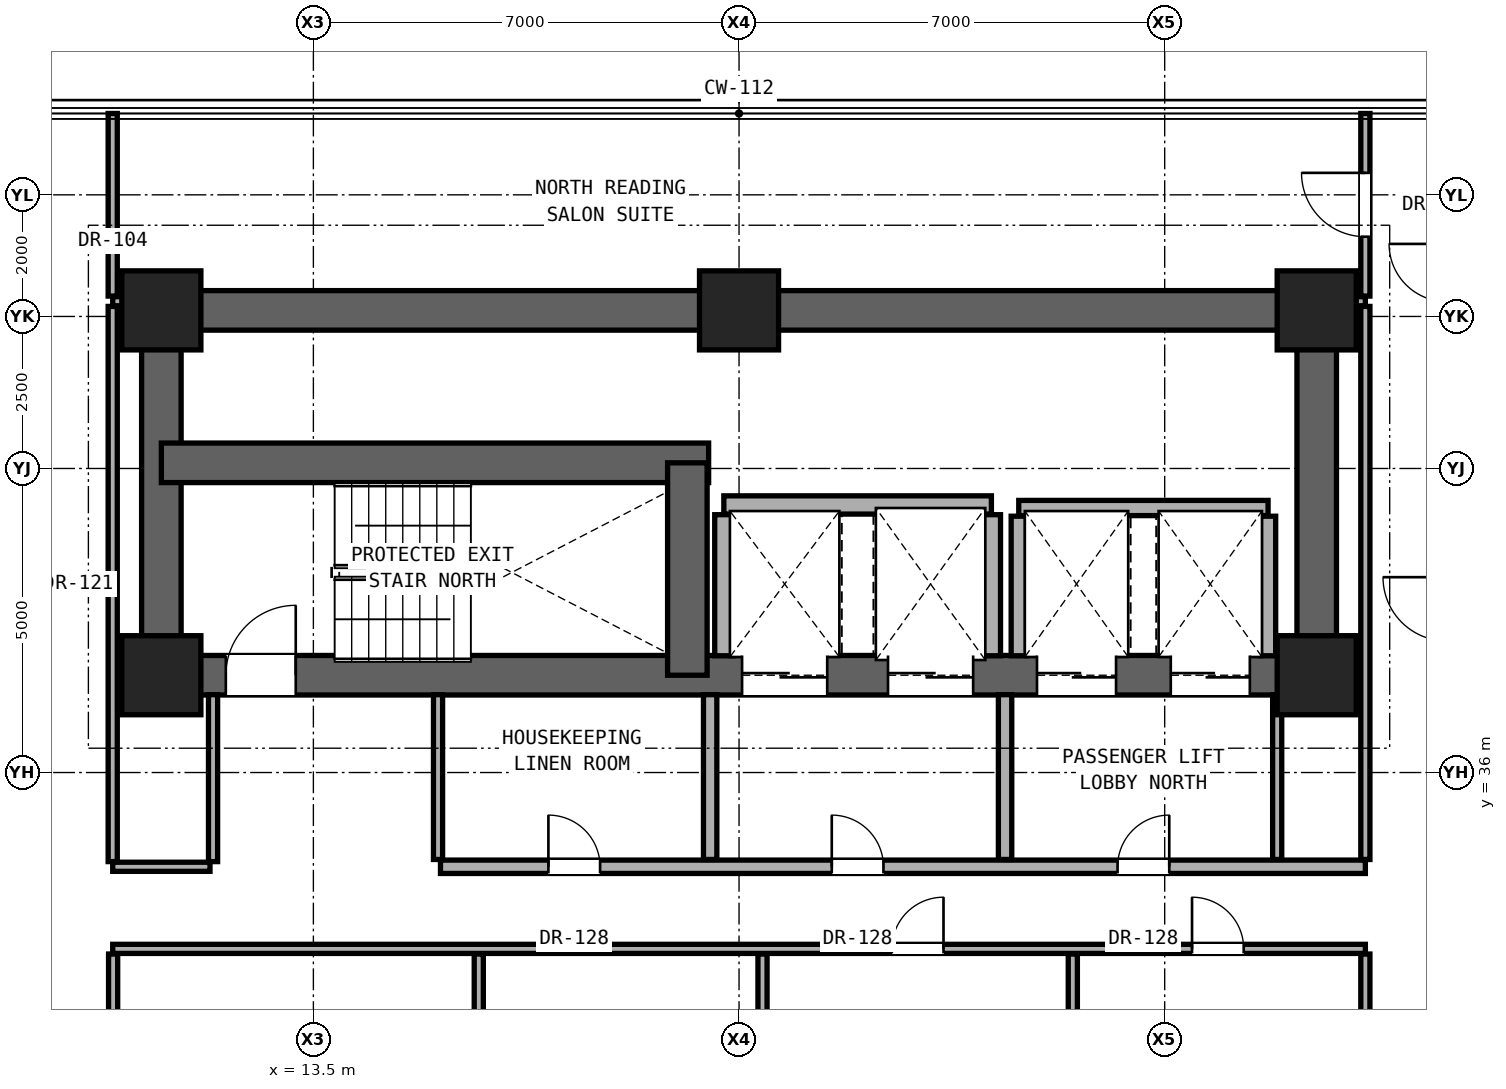
"""IFC4 building model, lengths in metres.
Left out: names, types, materials, properties, quantities, classifications, styles, units other than length and angle.
Written with IfcOpenShell. Run it as: python <this file> out.ifc"""

import sys

from ifc_helpers import new_model, si_unit, direction, frame, frame_2d, origin, origin_2d, place, context, subcontext, project, spatial, rectangle, extrude, element, fill, save


model = new_model("IFC4")
c1 = context("Model", 3, precision=1e-05, world=origin(), true_north=direction((0.0, 1.0)))
c2 = subcontext(c1, "Body", "Model", "MODEL_VIEW")
j1 = project(units=[si_unit("LENGTHUNIT", "METRE"), si_unit("PLANEANGLEUNIT", "RADIAN")], contexts=[c1])
p1 = place(None, origin())
s1 = spatial("IfcSite", under=j1, at=p1, CompositionType="ELEMENT")
p2 = place(p1, origin())
s2 = spatial("IfcBuilding", under=s1, at=p2, CompositionType="ELEMENT")
p3 = place(p2, frame((0.0, 0.0, 55.4)))
s3 = spatial("IfcBuildingStorey", under=s2, at=p3, CompositionType="ELEMENT", Elevation=55.4)
for number, where, z_axis, x_axis in (
    (1, (11.0, 37.6, 0.0), (0.0, 0.0, 1.0), (1.0, 0.0, 0.0)),
    (2, (30.0, 37.6, 0.0), (0.0, 0.0, 1.0), (1.0, 0.0, 0.0)),
    (3, (11.0, 43.6, 0.0), (0.0, 0.0, 1.0), (1.0, 0.0, 0.0)),
    (4, (20.5, 43.6, 0.0), (0.0, 0.0, 1.0), (1.0, 0.0, 0.0)),
    (5, (30.0, 43.6, 0.0), (0.0, 0.0, 1.0), (1.0, 0.0, 0.0)),
):
    element("IfcColumn", number, at=place(p3, frame(where, z_axis=z_axis, x_axis=x_axis)), inside=s3, PredefinedType="COLUMN", context=c2, shape_type="SweptSolid", body=[
        extrude(rectangle(XDim=1.3, YDim=1.3, at=origin_2d()), origin(), (0.0, 0.0, 1.0), 3.3),
    ])
p4 = place(p3, frame((11.0, 43.6, 0.0), z_axis=(0.0, 0.0, 1.0), x_axis=(1.0, 0.0, 0.0)))
e6 = element("IfcWall", 6, at=p4, inside=s3, PredefinedType="SHEAR", context=c2, shape_type="SweptSolid", body=[
    extrude(rectangle(XDim=19.0, YDim=0.65, at=frame_2d((9.5, 0.0))), origin(), (0.0, 0.0, 1.0), 3.06),
])
for number, where, z_axis, x_axis in (
    (7, (11.0, 37.6, 0.0), (0.0, 0.0, 1.0), (0.0, 1.0, 0.0)),
    (8, (30.0, 37.6, 0.0), (0.0, 0.0, 1.0), (0.0, 1.0, 0.0)),
):
    element("IfcWall", number, at=place(p3, frame(where, z_axis=z_axis, x_axis=x_axis)), inside=s3, PredefinedType="SHEAR", context=c2, shape_type="SweptSolid", body=[
        extrude(rectangle(XDim=6.0, YDim=0.65, at=frame_2d((3.0, 0.0))), origin(), (0.0, 0.0, 1.0), 3.06),
    ])
p5 = place(p3, frame((11.0, 37.6, 0.0), z_axis=(0.0, 0.0, 1.0), x_axis=(1.0, 0.0, 0.0)))
e9 = element("IfcWall", 9, at=p5, inside=s3, PredefinedType="SHEAR", context=c2, shape_type="SweptSolid", body=[
    extrude(rectangle(XDim=19.0, YDim=0.65, at=frame_2d((9.5, 0.0))), origin(), (0.0, 0.0, 1.0), 3.06),
])
p6 = place(p5, frame((1.06, 0.0, 0.0)))
e10 = element("IfcOpeningElement", 10, at=p6, cuts=e9, PredefinedType="OPENING", context=c2, shape_type="SweptSolid", body=[
    extrude(rectangle(XDim=1.15, YDim=2.2, at=frame_2d((0.575, 1.1))), frame((0.0, 0.335, 0.0), z_axis=(0.0, -1.0, 0.0), x_axis=(1.0, 0.0, 0.0)), (0.0, 0.0, 1.0), 0.67),
])
p7 = place(p5, frame((9.55, 0.0, 0.0)))
e11 = element("IfcOpeningElement", 11, at=p7, cuts=e9, PredefinedType="OPENING", context=c2, shape_type="SweptSolid", body=[
    extrude(rectangle(XDim=1.4, YDim=2.35, at=frame_2d((0.7, 1.175))), frame((0.0, 0.335, 0.0), z_axis=(0.0, -1.0, 0.0), x_axis=(1.0, 0.0, 0.0)), (0.0, 0.0, 1.0), 0.67),
])
p8 = place(p5, frame((11.95, 0.0, 0.0)))
e12 = element("IfcOpeningElement", 12, at=p8, cuts=e9, PredefinedType="OPENING", context=c2, shape_type="SweptSolid", body=[
    extrude(rectangle(XDim=1.4, YDim=2.35, at=frame_2d((0.7, 1.175))), frame((0.0, 0.335, 0.0), z_axis=(0.0, -1.0, 0.0), x_axis=(1.0, 0.0, 0.0)), (0.0, 0.0, 1.0), 0.67),
])
p9 = place(p5, frame((14.4, 0.0, 0.0)))
e13 = element("IfcOpeningElement", 13, at=p9, cuts=e9, PredefinedType="OPENING", context=c2, shape_type="SweptSolid", body=[
    extrude(rectangle(XDim=1.3, YDim=2.3, at=frame_2d((0.65, 1.15))), frame((0.0, 0.335, 0.0), z_axis=(0.0, -1.0, 0.0), x_axis=(1.0, 0.0, 0.0)), (0.0, 0.0, 1.0), 0.67),
])
p10 = place(p5, frame((16.6, 0.0, 0.0)))
e14 = element("IfcOpeningElement", 14, at=p10, cuts=e9, PredefinedType="OPENING", context=c2, shape_type="SweptSolid", body=[
    extrude(rectangle(XDim=1.3, YDim=2.3, at=frame_2d((0.65, 1.15))), frame((0.0, 0.335, 0.0), z_axis=(0.0, -1.0, 0.0), x_axis=(1.0, 0.0, 0.0)), (0.0, 0.0, 1.0), 0.67),
])
p11 = place(p3, frame((11.0, 41.093, 0.0), z_axis=(0.0, 0.0, 1.0), x_axis=(1.0, 0.0, 0.0)))
e15 = element("IfcWall", 15, at=p11, inside=s3, PredefinedType="SHEAR", context=c2, shape_type="SweptSolid", body=[
    extrude(rectangle(XDim=9.0, YDim=0.65, at=frame_2d((4.5, 0.0))), origin(), (0.0, 0.0, 1.0), 3.06),
])
p12 = place(p3, frame((19.65, 37.6, 0.0), z_axis=(0.0, 0.0, 1.0), x_axis=(0.0, 1.0, 0.0)))
e16 = element("IfcWall", 16, at=p12, inside=s3, PredefinedType="SHEAR", context=c2, shape_type="SweptSolid", body=[
    extrude(rectangle(XDim=3.493, YDim=0.65, at=frame_2d((1.747, 0.0))), origin(), (0.0, 0.0, 1.0), 3.06),
])
p13 = place(p3, frame((10.2, 33.1, 0.0), z_axis=(0.0, 0.0, 1.0), x_axis=(1.0, 0.0, 0.0)))
e17 = element("IfcWall", 17, at=p13, inside=s3, PredefinedType="PARTITIONING", context=c2, shape_type="SweptSolid", body=[
    extrude(rectangle(XDim=20.6, YDim=0.15, at=frame_2d((10.3, 0.0))), origin(), (0.0, 0.0, 1.0), 2.104),
])
p14 = place(p13, frame((12.812, 0.0, 0.0)))
e18 = element("IfcOpeningElement", 18, at=p14, cuts=e17, PredefinedType="OPENING", context=c2, shape_type="SweptSolid", body=[
    extrude(rectangle(XDim=0.85, YDim=2.01, at=frame_2d((0.425, 1.005))), frame((0.0, 0.085, 0.0), z_axis=(0.0, -1.0, 0.0), x_axis=(1.0, 0.0, 0.0)), (0.0, 0.0, 1.0), 0.17),
])
p15 = place(p13, frame((17.75, 0.0, 0.0)))
e19 = element("IfcOpeningElement", 19, at=p15, cuts=e17, PredefinedType="OPENING", context=c2, shape_type="SweptSolid", body=[
    extrude(rectangle(XDim=0.85, YDim=2.01, at=frame_2d((0.425, 1.005))), frame((0.0, 0.085, 0.0), z_axis=(0.0, -1.0, 0.0), x_axis=(1.0, 0.0, 0.0)), (0.0, 0.0, 1.0), 0.17),
])
p16 = place(p3, frame((10.2, 34.45, 0.0), z_axis=(0.0, 0.0, 1.0), x_axis=(1.0, 0.0, 0.0)))
e20 = element("IfcWall", 20, at=p16, inside=s3, PredefinedType="PARTITIONING", context=c2, shape_type="SweptSolid", body=[
    extrude(rectangle(XDim=1.6, YDim=0.15, at=frame_2d((0.8, 0.0))), origin(), (0.0, 0.0, 1.0), 2.104),
])
p17 = place(p3, frame((15.59, 34.45, 0.0), z_axis=(0.0, 0.0, 1.0), x_axis=(1.0, 0.0, 0.0)))
e21 = element("IfcWall", 21, at=p17, inside=s3, PredefinedType="SOLIDWALL", context=c2, shape_type="SweptSolid", body=[
    extrude(rectangle(XDim=15.21, YDim=0.22, at=frame_2d((7.605, 0.0))), origin(), (0.0, 0.0, 1.0), 2.104),
])
p18 = place(p17, frame((6.435, 0.0, 0.0)))
e22 = element("IfcOpeningElement", 22, at=p18, cuts=e21, PredefinedType="OPENING", context=c2, shape_type="SweptSolid", body=[
    extrude(rectangle(XDim=0.85, YDim=2.01, at=frame_2d((0.425, 1.005))), frame((0.0, 0.12, 0.0), z_axis=(0.0, -1.0, 0.0), x_axis=(1.0, 0.0, 0.0)), (0.0, 0.0, 1.0), 0.24),
])
p19 = place(p17, frame((11.135, 0.0, 0.0)))
e23 = element("IfcOpeningElement", 23, at=p19, cuts=e21, PredefinedType="OPENING", context=c2, shape_type="SweptSolid", body=[
    extrude(rectangle(XDim=0.85, YDim=2.01, at=frame_2d((0.425, 1.005))), frame((0.0, 0.12, 0.0), z_axis=(0.0, -1.0, 0.0), x_axis=(1.0, 0.0, 0.0)), (0.0, 0.0, 1.0), 0.24),
])
p20 = place(p17, frame((1.775, 0.0, 0.0)))
e24 = element("IfcOpeningElement", 24, at=p20, cuts=e21, PredefinedType="OPENING", context=c2, shape_type="SweptSolid", body=[
    extrude(rectangle(XDim=0.85, YDim=2.01, at=frame_2d((0.425, 1.005))), frame((0.0, 0.12, 0.0), z_axis=(0.0, -1.0, 0.0), x_axis=(1.0, 0.0, 0.0)), (0.0, 0.0, 1.0), 0.24),
])
p21 = place(p3, frame((25.1, 40.35, 0.0), z_axis=(0.0, 0.0, 1.0), x_axis=(1.0, 0.0, 0.0)))
e25 = element("IfcWall", 25, at=p21, inside=s3, PredefinedType="SOLIDWALL", context=c2, shape_type="SweptSolid", body=[
    extrude(rectangle(XDim=4.1, YDim=0.25, at=frame_2d((2.05, 0.0))), origin(), (0.0, 0.0, 1.0), 3.06),
])
p22 = place(p3, frame((20.25, 40.4, 0.0), z_axis=(0.0, 0.0, 1.0), x_axis=(1.0, 0.0, 0.0)))
e26 = element("IfcWall", 26, at=p22, inside=s3, PredefinedType="SOLIDWALL", context=c2, shape_type="SweptSolid", body=[
    extrude(rectangle(XDim=4.4, YDim=0.3, at=frame_2d((2.2, 0.0))), origin(), (0.0, 0.0, 1.0), 3.06),
])
for number, where, z_axis, x_axis in (
    (27, (10.2, 43.75, 0.0), (0.0, 0.0, 1.0), (1.0, 0.0, 0.0)),
    (28, (30.32, 43.75, 0.0), (0.0, 0.0, 1.0), (1.0, 0.0, 0.0)),
):
    element("IfcWall", number, at=place(p3, frame(where, z_axis=z_axis, x_axis=x_axis)), inside=s3, PredefinedType="PARTITIONING", context=c2, shape_type="SweptSolid", body=[
        extrude(rectangle(XDim=0.48, YDim=0.15, at=frame_2d((0.24, 0.0))), origin(), (0.0, 0.0, 1.0), 3.06),
    ])
p23 = place(p3, frame((10.207, 22.935, 0.0), z_axis=(0.0, 0.0, 1.0), x_axis=(0.0, 1.0, 0.0)))
e29 = element("IfcWall", 29, at=p23, inside=s3, PredefinedType="PARTITIONING", context=c2, shape_type="SweptSolid", body=[
    extrude(rectangle(XDim=10.08, YDim=0.15, at=frame_2d((5.04, 0.0))), origin(), (0.0, 0.0, 1.0), 2.279),
])
p24 = place(p23, frame((4.565, 0.0, 0.0)))
e30 = element("IfcOpeningElement", 30, at=p24, cuts=e29, PredefinedType="OPENING", context=c2, shape_type="SweptSolid", body=[
    extrude(rectangle(XDim=0.95, YDim=2.15, at=frame_2d((0.475, 1.075))), frame((0.0, 0.085, 0.0), z_axis=(0.0, -1.0, 0.0), x_axis=(1.0, 0.0, 0.0)), (0.0, 0.0, 1.0), 0.17),
])
p25 = place(p3, frame((10.2, 34.535, 0.0), z_axis=(0.0, 0.0, 1.0), x_axis=(0.0, 1.0, 0.0)))
e31 = element("IfcWall", 31, at=p25, inside=s3, PredefinedType="PARTITIONING", context=c2, shape_type="SweptSolid", body=[
    extrude(rectangle(XDim=9.13, YDim=0.15, at=frame_2d((4.565, 0.0))), origin(), (0.0, 0.0, 1.0), 2.436),
])
p26 = place(p3, frame((10.2, 43.835, 0.0), z_axis=(0.0, 0.0, 1.0), x_axis=(0.0, 1.0, 0.0)))
e32 = element("IfcWall", 32, at=p26, inside=s3, PredefinedType="PARTITIONING", context=c2, shape_type="SweptSolid", body=[
    extrude(rectangle(XDim=3.003, YDim=0.15, at=frame_2d((1.501, 0.0))), origin(), (0.0, 0.0, 1.0), 3.06),
])
p27 = place(p3, frame((11.85, 34.535, 0.0), z_axis=(0.0, 0.0, 1.0), x_axis=(0.0, 1.0, 0.0)))
e33 = element("IfcWall", 33, at=p27, inside=s3, PredefinedType="PARTITIONING", context=c2, shape_type="SweptSolid", body=[
    extrude(rectangle(XDim=2.745, YDim=0.15, at=frame_2d((1.373, 0.0))), origin(), (0.0, 0.0, 1.0), 3.06),
])
p28 = place(p3, frame((15.55, 34.57, 0.0), z_axis=(0.0, 0.0, 1.0), x_axis=(0.0, 1.0, 0.0)))
e34 = element("IfcWall", 34, at=p28, inside=s3, PredefinedType="PARTITIONING", context=c2, shape_type="SweptSolid", body=[
    extrude(rectangle(XDim=2.71, YDim=0.15, at=frame_2d((1.355, 0.0))), origin(), (0.0, 0.0, 1.0), 2.589),
])
p29 = place(p3, frame((16.22, 22.935, 0.0), z_axis=(0.0, 0.0, 1.0), x_axis=(0.0, 1.0, 0.0)))
e35 = element("IfcWall", 35, at=p29, inside=s3, PredefinedType="PARTITIONING", context=c2, shape_type="SweptSolid", body=[
    extrude(rectangle(XDim=10.08, YDim=0.15, at=frame_2d((5.04, 0.0))), origin(), (0.0, 0.0, 1.0), 2.104),
])
p30 = place(p3, frame((20.025, 34.57, 0.0), z_axis=(0.0, 0.0, 1.0), x_axis=(0.0, 1.0, 0.0)))
e36 = element("IfcWall", 36, at=p30, inside=s3, PredefinedType="SOLIDWALL", context=c2, shape_type="SweptSolid", body=[
    extrude(rectangle(XDim=2.71, YDim=0.22, at=frame_2d((1.355, 0.0))), origin(), (0.0, 0.0, 1.0), 3.06),
])
p31 = place(p3, frame((20.25, 37.92, 0.0), z_axis=(0.0, 0.0, 1.0), x_axis=(0.0, 1.0, 0.0)))
e37 = element("IfcWall", 37, at=p31, inside=s3, PredefinedType="SOLIDWALL", context=c2, shape_type="SweptSolid", body=[
    extrude(rectangle(XDim=2.32, YDim=0.3, at=frame_2d((1.16, 0.0))), origin(), (0.0, 0.0, 1.0), 3.06),
])
p32 = place(p3, frame((20.886, 19.985, 0.0), z_axis=(0.0, 0.0, 1.0), x_axis=(0.0, 1.0, 0.0)))
e38 = element("IfcWall", 38, at=p32, inside=s3, PredefinedType="PARTITIONING", context=c2, shape_type="SweptSolid", body=[
    extrude(rectangle(XDim=13.03, YDim=0.15, at=frame_2d((6.515, 0.0))), origin(), (0.0, 0.0, 1.0), 2.104),
])
p33 = place(p3, frame((24.65, 37.92, 0.0), z_axis=(0.0, 0.0, 1.0), x_axis=(0.0, 1.0, 0.0)))
e39 = element("IfcWall", 39, at=p33, inside=s3, PredefinedType="SOLIDWALL", context=c2, shape_type="SweptSolid", body=[
    extrude(rectangle(XDim=2.32, YDim=0.3, at=frame_2d((1.16, 0.0))), origin(), (0.0, 0.0, 1.0), 3.06),
])
p34 = place(p3, frame((24.875, 34.57, 0.0), z_axis=(0.0, 0.0, 1.0), x_axis=(0.0, 1.0, 0.0)))
e40 = element("IfcWall", 40, at=p34, inside=s3, PredefinedType="SOLIDWALL", context=c2, shape_type="SweptSolid", body=[
    extrude(rectangle(XDim=2.71, YDim=0.22, at=frame_2d((1.355, 0.0))), origin(), (0.0, 0.0, 1.0), 3.06),
])
p35 = place(p3, frame((25.1, 37.92, 0.0), z_axis=(0.0, 0.0, 1.0), x_axis=(0.0, 1.0, 0.0)))
e41 = element("IfcWall", 41, at=p35, inside=s3, PredefinedType="SOLIDWALL", context=c2, shape_type="SweptSolid", body=[
    extrude(rectangle(XDim=2.295, YDim=0.25, at=frame_2d((1.147, 0.0))), origin(), (0.0, 0.0, 1.0), 3.06),
])
p36 = place(p3, frame((25.989, 19.985, 0.0), z_axis=(0.0, 0.0, 1.0), x_axis=(0.0, 1.0, 0.0)))
e42 = element("IfcWall", 42, at=p36, inside=s3, PredefinedType="PARTITIONING", context=c2, shape_type="SweptSolid", body=[
    extrude(rectangle(XDim=13.03, YDim=0.15, at=frame_2d((6.515, 0.0))), origin(), (0.0, 0.0, 1.0), 2.104),
])
p37 = place(p3, frame((29.35, 34.57, 0.0), z_axis=(0.0, 0.0, 1.0), x_axis=(0.0, 1.0, 0.0)))
e43 = element("IfcWall", 43, at=p37, inside=s3, PredefinedType="PARTITIONING", context=c2, shape_type="SweptSolid", body=[
    extrude(rectangle(XDim=2.71, YDim=0.15, at=frame_2d((1.355, 0.0))), origin(), (0.0, 0.0, 1.0), 3.06),
])
p38 = place(p3, frame((29.2, 37.92, 0.0), z_axis=(0.0, 0.0, 1.0), x_axis=(0.0, 1.0, 0.0)))
e44 = element("IfcWall", 44, at=p38, inside=s3, PredefinedType="SOLIDWALL", context=c2, shape_type="SweptSolid", body=[
    extrude(rectangle(XDim=2.295, YDim=0.25, at=frame_2d((1.147, 0.0))), origin(), (0.0, 0.0, 1.0), 3.06),
])
p39 = place(p3, frame((30.8, 19.985, 0.0), z_axis=(0.0, 0.0, 1.0), x_axis=(0.0, 1.0, 0.0)))
e45 = element("IfcWall", 45, at=p39, inside=s3, PredefinedType="PARTITIONING", context=c2, shape_type="SweptSolid", body=[
    extrude(rectangle(XDim=13.03, YDim=0.15, at=frame_2d((6.515, 0.0))), origin(), (0.0, 0.0, 1.0), 2.279),
])
p40 = place(p3, frame((30.8, 34.57, 0.0), z_axis=(0.0, 0.0, 1.0), x_axis=(0.0, 1.0, 0.0)))
e46 = element("IfcWall", 46, at=p40, inside=s3, PredefinedType="PARTITIONING", context=c2, shape_type="SweptSolid", body=[
    extrude(rectangle(XDim=9.095, YDim=0.15, at=frame_2d((4.547, 0.0))), origin(), (0.0, 0.0, 1.0), 2.436),
])
p41 = place(p3, frame((30.8, 43.835, 0.0), z_axis=(0.0, 0.0, 1.0), x_axis=(0.0, 1.0, 0.0)))
e47 = element("IfcWall", 47, at=p41, inside=s3, PredefinedType="PARTITIONING", context=c2, shape_type="SweptSolid", body=[
    extrude(rectangle(XDim=3.003, YDim=0.15, at=frame_2d((1.501, 0.0))), origin(), (0.0, 0.0, 1.0), 3.06),
])
p42 = place(p41, frame((0.977, 0.0, 0.0)))
e48 = element("IfcOpeningElement", 48, at=p42, cuts=e47, PredefinedType="OPENING", context=c2, shape_type="SweptSolid", body=[
    extrude(rectangle(XDim=1.05, YDim=2.2, at=frame_2d((0.525, 1.1))), frame((0.0, 0.085, 0.0), z_axis=(0.0, -1.0, 0.0), x_axis=(1.0, 0.0, 0.0)), (0.0, 0.0, 1.0), 0.17),
])
p43 = place(p6, origin())
e49 = element("IfcDoor", 49, at=p43, inside=s3, OperationType="SINGLE_SWING_RIGHT", PredefinedType="DOOR", context=c2, shape_type="SweptSolid", body=[
    extrude(rectangle(XDim=1.15, YDim=2.2, at=frame_2d((0.575, 1.1))), frame((0.0, 0.025, 0.0), z_axis=(0.0, -1.0, 0.0), x_axis=(1.0, 0.0, 0.0)), (0.0, 0.0, 1.0), 0.05),
])
fill(e10, e49)
p44 = place(p18, origin())
e50 = element("IfcDoor", 50, at=p44, inside=s3, OperationType="SINGLE_SWING_LEFT", PredefinedType="DOOR", context=c2, shape_type="SweptSolid", body=[
    extrude(rectangle(XDim=0.85, YDim=2.01, at=frame_2d((0.425, 1.005))), frame((0.0, 0.025, 0.0), z_axis=(0.0, -1.0, 0.0), x_axis=(1.0, 0.0, 0.0)), (0.0, 0.0, 1.0), 0.05),
])
fill(e22, e50)
p45 = place(p19, origin())
e51 = element("IfcDoor", 51, at=p45, inside=s3, OperationType="SINGLE_SWING_RIGHT", PredefinedType="DOOR", context=c2, shape_type="SweptSolid", body=[
    extrude(rectangle(XDim=0.85, YDim=2.01, at=frame_2d((0.425, 1.005))), frame((0.0, 0.025, 0.0), z_axis=(0.0, -1.0, 0.0), x_axis=(1.0, 0.0, 0.0)), (0.0, 0.0, 1.0), 0.05),
])
fill(e23, e51)
p46 = place(p20, origin())
e52 = element("IfcDoor", 52, at=p46, inside=s3, OperationType="SINGLE_SWING_LEFT", PredefinedType="DOOR", context=c2, shape_type="SweptSolid", body=[
    extrude(rectangle(XDim=0.85, YDim=2.01, at=frame_2d((0.425, 1.005))), frame((0.0, 0.025, 0.0), z_axis=(0.0, -1.0, 0.0), x_axis=(1.0, 0.0, 0.0)), (0.0, 0.0, 1.0), 0.05),
])
fill(e24, e52)
p47 = place(p14, origin())
e53 = element("IfcDoor", 53, at=p47, inside=s3, OperationType="SINGLE_SWING_RIGHT", PredefinedType="DOOR", context=c2, shape_type="SweptSolid", body=[
    extrude(rectangle(XDim=0.85, YDim=2.01, at=frame_2d((0.425, 1.005))), frame((0.0, 0.025, 0.0), z_axis=(0.0, -1.0, 0.0), x_axis=(1.0, 0.0, 0.0)), (0.0, 0.0, 1.0), 0.05),
])
fill(e18, e53)
p48 = place(p15, origin())
e54 = element("IfcDoor", 54, at=p48, inside=s3, OperationType="SINGLE_SWING_LEFT", PredefinedType="DOOR", context=c2, shape_type="SweptSolid", body=[
    extrude(rectangle(XDim=0.85, YDim=2.01, at=frame_2d((0.425, 1.005))), frame((0.0, 0.025, 0.0), z_axis=(0.0, -1.0, 0.0), x_axis=(1.0, 0.0, 0.0)), (0.0, 0.0, 1.0), 0.05),
])
fill(e19, e54)
p49 = place(p42, origin())
e55 = element("IfcDoor", 55, at=p49, inside=s3, OperationType="SINGLE_SWING_RIGHT", PredefinedType="DOOR", context=c2, shape_type="SweptSolid", body=[
    extrude(rectangle(XDim=1.05, YDim=2.2, at=frame_2d((0.525, 1.1))), frame((0.0, 0.025, 0.0), z_axis=(0.0, -1.0, 0.0), x_axis=(1.0, 0.0, 0.0)), (0.0, 0.0, 1.0), 0.05),
])
fill(e48, e55)
p50 = place(p7, origin())
e56 = element("IfcDoor", 56, at=p50, inside=s3, OperationType="DOUBLE_DOOR_SLIDING", PredefinedType="DOOR", context=c2, shape_type="SweptSolid", body=[
    extrude(rectangle(XDim=1.4, YDim=2.35, at=frame_2d((0.7, 1.175))), frame((0.0, 0.025, 0.0), z_axis=(0.0, -1.0, 0.0), x_axis=(1.0, 0.0, 0.0)), (0.0, 0.0, 1.0), 0.05),
])
fill(e11, e56)
p51 = place(p8, origin())
e57 = element("IfcDoor", 57, at=p51, inside=s3, OperationType="DOUBLE_DOOR_SLIDING", PredefinedType="DOOR", context=c2, shape_type="SweptSolid", body=[
    extrude(rectangle(XDim=1.4, YDim=2.35, at=frame_2d((0.7, 1.175))), frame((0.0, 0.025, 0.0), z_axis=(0.0, -1.0, 0.0), x_axis=(1.0, 0.0, 0.0)), (0.0, 0.0, 1.0), 0.05),
])
fill(e12, e57)
p52 = place(p9, origin())
e58 = element("IfcDoor", 58, at=p52, inside=s3, OperationType="DOUBLE_DOOR_SLIDING", PredefinedType="DOOR", context=c2, shape_type="SweptSolid", body=[
    extrude(rectangle(XDim=1.3, YDim=2.3, at=frame_2d((0.65, 1.15))), frame((0.0, 0.025, 0.0), z_axis=(0.0, -1.0, 0.0), x_axis=(1.0, 0.0, 0.0)), (0.0, 0.0, 1.0), 0.05),
])
fill(e13, e58)
p53 = place(p10, origin())
e59 = element("IfcDoor", 59, at=p53, inside=s3, OperationType="DOUBLE_DOOR_SLIDING", PredefinedType="DOOR", context=c2, shape_type="SweptSolid", body=[
    extrude(rectangle(XDim=1.3, YDim=2.3, at=frame_2d((0.65, 1.15))), frame((0.0, 0.025, 0.0), z_axis=(0.0, -1.0, 0.0), x_axis=(1.0, 0.0, 0.0)), (0.0, 0.0, 1.0), 0.05),
])
fill(e14, e59)
save(model, sys.argv[1])
